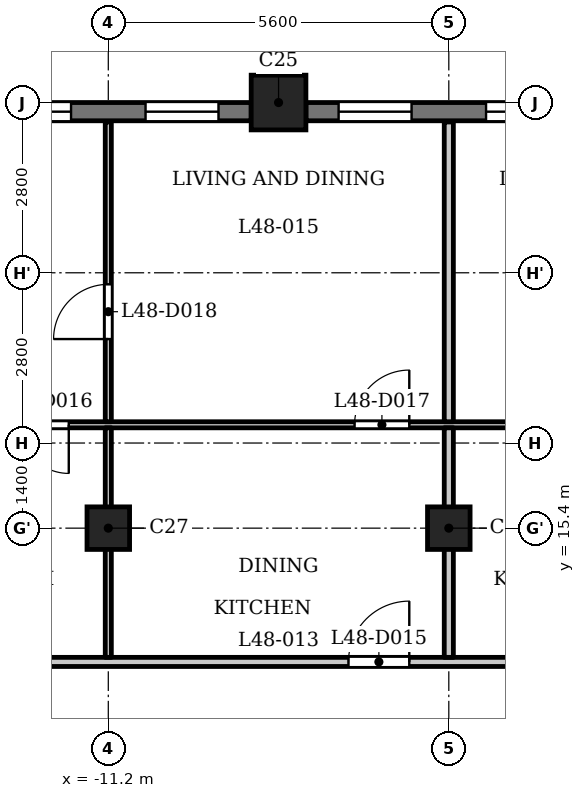
"""IFC4 building model, lengths in metres.
Left out: names, types, materials, properties, quantities, classifications, styles, units other than length and angle.
Written with IfcOpenShell. Run it as: python <this file> out.ifc"""

import sys

from ifc_helpers import new_model, si_unit, direction, frame, frame_2d, origin, origin_2d, place, context, subcontext, project, spatial, rectangle, extrude, element, fill, save


model = new_model("IFC4")
c1 = context("Model", 3, precision=1e-05, world=origin(), true_north=direction((0.0, 1.0)))
c2 = subcontext(c1, "Body", "Model", "MODEL_VIEW")
j1 = project(units=[si_unit("LENGTHUNIT", "METRE"), si_unit("PLANEANGLEUNIT", "RADIAN")], contexts=[c1])
p1 = place(None, origin())
s1 = spatial("IfcSite", under=j1, at=p1, CompositionType="ELEMENT")
p2 = place(p1, origin())
s2 = spatial("IfcBuilding", under=s1, at=p2, CompositionType="ELEMENT")
p3 = place(p2, frame((0.0, 0.0, 188.9)))
s3 = spatial("IfcBuildingStorey", under=s2, at=p3, CompositionType="ELEMENT", Elevation=188.9)
p4 = place(p3, frame((-8.4, 22.4, 0.0), z_axis=(0.0, 0.0, 1.0), x_axis=(1.0, 0.0, 0.0)))
e1 = element("IfcColumn", 1, at=p4, inside=s3, PredefinedType="COLUMN", context=c2, shape_type="SweptSolid", body=[
    extrude(rectangle(XDim=0.9, YDim=0.9, at=origin_2d()), origin(), (0.0, 0.0, 1.0), 3.5),
])
for number, where, z_axis, x_axis in (
    (2, (-11.2, 15.4, 0.0), (0.0, 0.0, 1.0), (1.0, 0.0, 0.0)),
    (3, (-5.6, 15.4, 0.0), (0.0, 0.0, 1.0), (1.0, 0.0, 0.0)),
):
    element("IfcColumn", number, at=place(p3, frame(where, z_axis=z_axis, x_axis=x_axis)), inside=s3, PredefinedType="COLUMN", context=c2, shape_type="SweptSolid", body=[
        extrude(rectangle(XDim=0.7, YDim=0.7, at=origin_2d()), origin(), (0.0, 0.0, 1.0), 3.5),
    ])
p5 = place(p3, frame((-3.25, 22.25, 0.0), z_axis=(0.0, 0.0, 1.0), x_axis=(-1.0, 0.0, 0.0)))
e4 = element("IfcWall", 4, at=p5, inside=s3, PredefinedType="SOLIDWALL", context=c2, shape_type="SweptSolid", body=[
    extrude(rectangle(XDim=4.7, YDim=0.3, at=frame_2d((2.35, 0.0))), origin(), (0.0, 0.0, 1.0), 2.5),
])
p6 = place(p5, frame((0.538, 0.0, 0.6)))
e5 = element("IfcOpeningElement", 5, at=p6, cuts=e4, PredefinedType="OPENING", context=c2, shape_type="SweptSolid", body=[
    extrude(rectangle(XDim=1.2, YDim=1.55, at=frame_2d((0.6, 0.775))), frame((0.0, 0.16, 0.0), z_axis=(0.0, -1.0, 0.0), x_axis=(1.0, 0.0, 0.0)), (0.0, 0.0, 1.0), 0.32),
])
p7 = place(p5, frame((2.962, 0.0, 0.6)))
e6 = element("IfcOpeningElement", 6, at=p7, cuts=e4, PredefinedType="OPENING", context=c2, shape_type="SweptSolid", body=[
    extrude(rectangle(XDim=1.2, YDim=1.55, at=frame_2d((0.6, 0.775))), frame((0.0, 0.16, 0.0), z_axis=(0.0, -1.0, 0.0), x_axis=(1.0, 0.0, 0.0)), (0.0, 0.0, 1.0), 0.32),
])
p8 = place(p3, frame((-8.85, 22.25, 0.0), z_axis=(0.0, 0.0, 1.0), x_axis=(-1.0, 0.0, 0.0)))
e7 = element("IfcWall", 7, at=p8, inside=s3, PredefinedType="SOLIDWALL", context=c2, shape_type="SweptSolid", body=[
    extrude(rectangle(XDim=4.7, YDim=0.3, at=frame_2d((2.35, 0.0))), origin(), (0.0, 0.0, 1.0), 2.5),
])
p9 = place(p8, frame((0.538, 0.0, 0.6)))
e8 = element("IfcOpeningElement", 8, at=p9, cuts=e7, PredefinedType="OPENING", context=c2, shape_type="SweptSolid", body=[
    extrude(rectangle(XDim=1.2, YDim=1.55, at=frame_2d((0.6, 0.775))), frame((0.0, 0.16, 0.0), z_axis=(0.0, -1.0, 0.0), x_axis=(1.0, 0.0, 0.0)), (0.0, 0.0, 1.0), 0.32),
])
p10 = place(p8, frame((2.962, 0.0, 0.6)))
e9 = element("IfcOpeningElement", 9, at=p10, cuts=e7, PredefinedType="OPENING", context=c2, shape_type="SweptSolid", body=[
    extrude(rectangle(XDim=1.2, YDim=1.55, at=frame_2d((0.6, 0.775))), frame((0.0, 0.16, 0.0), z_axis=(0.0, -1.0, 0.0), x_axis=(1.0, 0.0, 0.0)), (0.0, 0.0, 1.0), 0.32),
])
p11 = place(p3, frame((-17.4, 13.2, 0.0), z_axis=(0.0, 0.0, 1.0), x_axis=(1.0, 0.0, 0.0)))
e10 = element("IfcWall", 10, at=p11, inside=s3, PredefinedType="PARTITIONING", context=c2, shape_type="SweptSolid", body=[
    extrude(rectangle(XDim=34.8, YDim=0.15, at=frame_2d((17.4, 0.0))), origin(), (0.0, 0.0, 1.0), 3.2),
])
p12 = place(p11, frame((0.25, 0.0, 0.0)))
e11 = element("IfcOpeningElement", 11, at=p12, cuts=e10, PredefinedType="OPENING", context=c2, shape_type="SweptSolid", body=[
    extrude(rectangle(XDim=1.0, YDim=2.1, at=frame_2d((0.5, 1.05))), frame((0.0, 0.085, 0.0), z_axis=(0.0, -1.0, 0.0), x_axis=(1.0, 0.0, 0.0)), (0.0, 0.0, 1.0), 0.17),
])
p13 = place(p11, frame((33.65, 0.0, 0.0)))
e12 = element("IfcOpeningElement", 12, at=p13, cuts=e10, PredefinedType="OPENING", context=c2, shape_type="SweptSolid", body=[
    extrude(rectangle(XDim=1.0, YDim=2.1, at=frame_2d((0.5, 1.05))), frame((0.0, 0.085, 0.0), z_axis=(0.0, -1.0, 0.0), x_axis=(1.0, 0.0, 0.0)), (0.0, 0.0, 1.0), 0.17),
])
p14 = place(p11, frame((10.15, 0.0, 0.0)))
e13 = element("IfcOpeningElement", 13, at=p14, cuts=e10, PredefinedType="OPENING", context=c2, shape_type="SweptSolid", body=[
    extrude(rectangle(XDim=1.0, YDim=2.1, at=frame_2d((0.5, 1.05))), frame((0.0, 0.085, 0.0), z_axis=(0.0, -1.0, 0.0), x_axis=(1.0, 0.0, 0.0)), (0.0, 0.0, 1.0), 0.17),
])
p15 = place(p11, frame((13.55, 0.0, 0.0)))
e14 = element("IfcOpeningElement", 14, at=p15, cuts=e10, PredefinedType="OPENING", context=c2, shape_type="SweptSolid", body=[
    extrude(rectangle(XDim=1.0, YDim=2.1, at=frame_2d((0.5, 1.05))), frame((0.0, 0.085, 0.0), z_axis=(0.0, -1.0, 0.0), x_axis=(1.0, 0.0, 0.0)), (0.0, 0.0, 1.0), 0.17),
])
p16 = place(p11, frame((20.85, 0.0, 0.0)))
e15 = element("IfcOpeningElement", 15, at=p16, cuts=e10, PredefinedType="OPENING", context=c2, shape_type="SweptSolid", body=[
    extrude(rectangle(XDim=1.0, YDim=2.1, at=frame_2d((0.5, 1.05))), frame((0.0, 0.085, 0.0), z_axis=(0.0, -1.0, 0.0), x_axis=(1.0, 0.0, 0.0)), (0.0, 0.0, 1.0), 0.17),
])
p17 = place(p11, frame((23.7, 0.0, 0.0)))
e16 = element("IfcOpeningElement", 16, at=p17, cuts=e10, PredefinedType="OPENING", context=c2, shape_type="SweptSolid", body=[
    extrude(rectangle(XDim=1.0, YDim=2.1, at=frame_2d((0.5, 1.05))), frame((0.0, 0.085, 0.0), z_axis=(0.0, -1.0, 0.0), x_axis=(1.0, 0.0, 0.0)), (0.0, 0.0, 1.0), 0.17),
])
p18 = place(p3, frame((-16.725, 17.1, 0.0), z_axis=(0.0, 0.0, 1.0), x_axis=(1.0, 0.0, 0.0)))
e17 = element("IfcWall", 17, at=p18, inside=s3, PredefinedType="PARTITIONING", context=c2, shape_type="SweptSolid", body=[
    extrude(rectangle(XDim=33.45, YDim=0.1, at=frame_2d((16.725, 0.0))), origin(), (0.0, 0.0, 1.0), 3.2),
])
p19 = place(p18, frame((4.075, 0.0, 0.0)))
e18 = element("IfcOpeningElement", 18, at=p19, cuts=e17, PredefinedType="OPENING", context=c2, shape_type="SweptSolid", body=[
    extrude(rectangle(XDim=0.8, YDim=2.1, at=frame_2d((0.4, 1.05))), frame((0.0, 0.06, 0.0), z_axis=(0.0, -1.0, 0.0), x_axis=(1.0, 0.0, 0.0)), (0.0, 0.0, 1.0), 0.12),
])
p20 = place(p18, frame((9.575, 0.0, 0.0)))
e19 = element("IfcOpeningElement", 19, at=p20, cuts=e17, PredefinedType="OPENING", context=c2, shape_type="SweptSolid", body=[
    extrude(rectangle(XDim=0.9, YDim=2.1, at=frame_2d((0.45, 1.05))), frame((0.0, 0.06, 0.0), z_axis=(0.0, -1.0, 0.0), x_axis=(1.0, 0.0, 0.0)), (0.0, 0.0, 1.0), 0.12),
])
p21 = place(p18, frame((15.175, 0.0, 0.0)))
e20 = element("IfcOpeningElement", 20, at=p21, cuts=e17, PredefinedType="OPENING", context=c2, shape_type="SweptSolid", body=[
    extrude(rectangle(XDim=0.8, YDim=2.1, at=frame_2d((0.4, 1.05))), frame((0.0, 0.06, 0.0), z_axis=(0.0, -1.0, 0.0), x_axis=(1.0, 0.0, 0.0)), (0.0, 0.0, 1.0), 0.12),
])
p22 = place(p18, frame((12.975, 0.0, 0.0)))
e21 = element("IfcOpeningElement", 21, at=p22, cuts=e17, PredefinedType="OPENING", context=c2, shape_type="SweptSolid", body=[
    extrude(rectangle(XDim=0.9, YDim=2.1, at=frame_2d((0.45, 1.05))), frame((0.0, 0.06, 0.0), z_axis=(0.0, -1.0, 0.0), x_axis=(1.0, 0.0, 0.0)), (0.0, 0.0, 1.0), 0.12),
])
p23 = place(p18, frame((17.625, 0.0, 0.0)))
e22 = element("IfcOpeningElement", 22, at=p23, cuts=e17, PredefinedType="OPENING", context=c2, shape_type="SweptSolid", body=[
    extrude(rectangle(XDim=0.8, YDim=2.1, at=frame_2d((0.4, 1.05))), frame((0.0, 0.06, 0.0), z_axis=(0.0, -1.0, 0.0), x_axis=(1.0, 0.0, 0.0)), (0.0, 0.0, 1.0), 0.12),
])
p24 = place(p18, frame((20.025, 0.0, 0.0)))
e23 = element("IfcOpeningElement", 23, at=p24, cuts=e17, PredefinedType="OPENING", context=c2, shape_type="SweptSolid", body=[
    extrude(rectangle(XDim=0.9, YDim=2.1, at=frame_2d((0.45, 1.05))), frame((0.0, 0.06, 0.0), z_axis=(0.0, -1.0, 0.0), x_axis=(1.0, 0.0, 0.0)), (0.0, 0.0, 1.0), 0.12),
])
p25 = place(p18, frame((31.975, 0.0, 0.0)))
e24 = element("IfcOpeningElement", 24, at=p25, cuts=e17, PredefinedType="OPENING", context=c2, shape_type="SweptSolid", body=[
    extrude(rectangle(XDim=0.8, YDim=2.1, at=frame_2d((0.4, 1.05))), frame((0.0, 0.06, 0.0), z_axis=(0.0, -1.0, 0.0), x_axis=(1.0, 0.0, 0.0)), (0.0, 0.0, 1.0), 0.12),
])
p26 = place(p18, frame((29.775, 0.0, 0.0)))
e25 = element("IfcOpeningElement", 25, at=p26, cuts=e17, PredefinedType="OPENING", context=c2, shape_type="SweptSolid", body=[
    extrude(rectangle(XDim=0.9, YDim=2.1, at=frame_2d((0.45, 1.05))), frame((0.0, 0.06, 0.0), z_axis=(0.0, -1.0, 0.0), x_axis=(1.0, 0.0, 0.0)), (0.0, 0.0, 1.0), 0.12),
])
p27 = place(p18, frame((23.025, 0.0, 0.0)))
e26 = element("IfcOpeningElement", 26, at=p27, cuts=e17, PredefinedType="OPENING", context=c2, shape_type="SweptSolid", body=[
    extrude(rectangle(XDim=0.9, YDim=2.1, at=frame_2d((0.45, 1.05))), frame((0.0, 0.06, 0.0), z_axis=(0.0, -1.0, 0.0), x_axis=(1.0, 0.0, 0.0)), (0.0, 0.0, 1.0), 0.12),
])
p28 = place(p18, frame((26.125, 0.0, 0.0)))
e27 = element("IfcOpeningElement", 27, at=p28, cuts=e17, PredefinedType="OPENING", context=c2, shape_type="SweptSolid", body=[
    extrude(rectangle(XDim=0.9, YDim=2.1, at=frame_2d((0.45, 1.05))), frame((0.0, 0.06, 0.0), z_axis=(0.0, -1.0, 0.0), x_axis=(1.0, 0.0, 0.0)), (0.0, 0.0, 1.0), 0.12),
])
p29 = place(p3, frame((-11.2, 13.275, 0.0), z_axis=(0.0, 0.0, 1.0), x_axis=(0.0, 1.0, 0.0)))
e28 = element("IfcWall", 28, at=p29, inside=s3, PredefinedType="PARTITIONING", context=c2, shape_type="SweptSolid", body=[
    extrude(rectangle(XDim=3.775, YDim=0.1, at=frame_2d((1.888, 0.0))), origin(), (0.0, 0.0, 1.0), 3.2),
])
p30 = place(p3, frame((-11.2, 17.15, 0.0), z_axis=(0.0, 0.0, 1.0), x_axis=(0.0, 1.0, 0.0)))
e29 = element("IfcWall", 29, at=p30, inside=s3, PredefinedType="PARTITIONING", context=c2, shape_type="SweptSolid", body=[
    extrude(rectangle(XDim=4.93, YDim=0.1, at=frame_2d((2.465, 0.0))), origin(), (0.0, 0.0, 1.0), 3.2),
])
p31 = place(p30, frame((1.36, 0.0, 0.0)))
e30 = element("IfcOpeningElement", 30, at=p31, cuts=e29, PredefinedType="OPENING", context=c2, shape_type="SweptSolid", body=[
    extrude(rectangle(XDim=0.9, YDim=2.1, at=frame_2d((0.45, 1.05))), frame((0.0, 0.06, 0.0), z_axis=(0.0, -1.0, 0.0), x_axis=(1.0, 0.0, 0.0)), (0.0, 0.0, 1.0), 0.12),
])
p32 = place(p3, frame((-5.6, 13.275, 0.0), z_axis=(0.0, 0.0, 1.0), x_axis=(0.0, 1.0, 0.0)))
e31 = element("IfcWall", 31, at=p32, inside=s3, PredefinedType="PARTITIONING", context=c2, shape_type="SweptSolid", body=[
    extrude(rectangle(XDim=3.775, YDim=0.15, at=frame_2d((1.888, 0.0))), origin(), (0.0, 0.0, 1.0), 3.2),
])
p33 = place(p3, frame((-5.6, 17.15, 0.0), z_axis=(0.0, 0.0, 1.0), x_axis=(0.0, 1.0, 0.0)))
e32 = element("IfcWall", 32, at=p33, inside=s3, PredefinedType="PARTITIONING", context=c2, shape_type="SweptSolid", body=[
    extrude(rectangle(XDim=4.93, YDim=0.15, at=frame_2d((2.465, 0.0))), origin(), (0.0, 0.0, 1.0), 3.2),
])
p34 = place(p14, origin())
e33 = element("IfcDoor", 33, at=p34, inside=s3, OperationType="SINGLE_SWING_LEFT", PredefinedType="DOOR", context=c2, shape_type="SweptSolid", body=[
    extrude(rectangle(XDim=1.0, YDim=2.1, at=frame_2d((0.5, 1.05))), frame((0.0, 0.025, 0.0), z_axis=(0.0, -1.0, 0.0), x_axis=(1.0, 0.0, 0.0)), (0.0, 0.0, 1.0), 0.05),
])
fill(e13, e33)
p35 = place(p19, origin())
e34 = element("IfcDoor", 34, at=p35, inside=s3, OperationType="SINGLE_SWING_RIGHT", PredefinedType="DOOR", context=c2, shape_type="SweptSolid", body=[
    extrude(rectangle(XDim=0.8, YDim=2.1, at=frame_2d((0.4, 1.05))), frame((0.0, 0.025, 0.0), z_axis=(0.0, -1.0, 0.0), x_axis=(1.0, 0.0, 0.0)), (0.0, 0.0, 1.0), 0.05),
])
fill(e18, e34)
p36 = place(p20, origin())
e35 = element("IfcDoor", 35, at=p36, inside=s3, OperationType="SINGLE_SWING_LEFT", PredefinedType="DOOR", context=c2, shape_type="SweptSolid", body=[
    extrude(rectangle(XDim=0.9, YDim=2.1, at=frame_2d((0.45, 1.05))), frame((0.0, 0.025, 0.0), z_axis=(0.0, -1.0, 0.0), x_axis=(1.0, 0.0, 0.0)), (0.0, 0.0, 1.0), 0.05),
])
fill(e19, e35)
p37 = place(p31, origin())
e36 = element("IfcDoor", 36, at=p37, inside=s3, OperationType="SINGLE_SWING_RIGHT", PredefinedType="DOOR", context=c2, shape_type="SweptSolid", body=[
    extrude(rectangle(XDim=0.9, YDim=2.1, at=frame_2d((0.45, 1.05))), frame((0.0, 0.025, 0.0), z_axis=(0.0, -1.0, 0.0), x_axis=(1.0, 0.0, 0.0)), (0.0, 0.0, 1.0), 0.05),
])
fill(e30, e36)
p38 = place(p6, origin())
e37 = element("IfcWindow", 37, at=p38, inside=s3, PartitioningType="SINGLE_PANEL", PredefinedType="WINDOW", context=c2, shape_type="SweptSolid", body=[
    extrude(rectangle(XDim=1.2, YDim=1.55, at=frame_2d((0.6, 0.775))), frame((0.0, 0.03, 0.0), z_axis=(0.0, -1.0, 0.0), x_axis=(1.0, 0.0, 0.0)), (0.0, 0.0, 1.0), 0.06),
])
fill(e5, e37)
p39 = place(p7, origin())
e38 = element("IfcWindow", 38, at=p39, inside=s3, PartitioningType="SINGLE_PANEL", PredefinedType="WINDOW", context=c2, shape_type="SweptSolid", body=[
    extrude(rectangle(XDim=1.2, YDim=1.55, at=frame_2d((0.6, 0.775))), frame((0.0, 0.03, 0.0), z_axis=(0.0, -1.0, 0.0), x_axis=(1.0, 0.0, 0.0)), (0.0, 0.0, 1.0), 0.06),
])
fill(e6, e38)
p40 = place(p9, origin())
e39 = element("IfcWindow", 39, at=p40, inside=s3, PartitioningType="SINGLE_PANEL", PredefinedType="WINDOW", context=c2, shape_type="SweptSolid", body=[
    extrude(rectangle(XDim=1.2, YDim=1.55, at=frame_2d((0.6, 0.775))), frame((0.0, 0.03, 0.0), z_axis=(0.0, -1.0, 0.0), x_axis=(1.0, 0.0, 0.0)), (0.0, 0.0, 1.0), 0.06),
])
fill(e8, e39)
p41 = place(p10, origin())
e40 = element("IfcWindow", 40, at=p41, inside=s3, PartitioningType="SINGLE_PANEL", PredefinedType="WINDOW", context=c2, shape_type="SweptSolid", body=[
    extrude(rectangle(XDim=1.2, YDim=1.55, at=frame_2d((0.6, 0.775))), frame((0.0, 0.03, 0.0), z_axis=(0.0, -1.0, 0.0), x_axis=(1.0, 0.0, 0.0)), (0.0, 0.0, 1.0), 0.06),
])
fill(e9, e40)
save(model, sys.argv[1])
